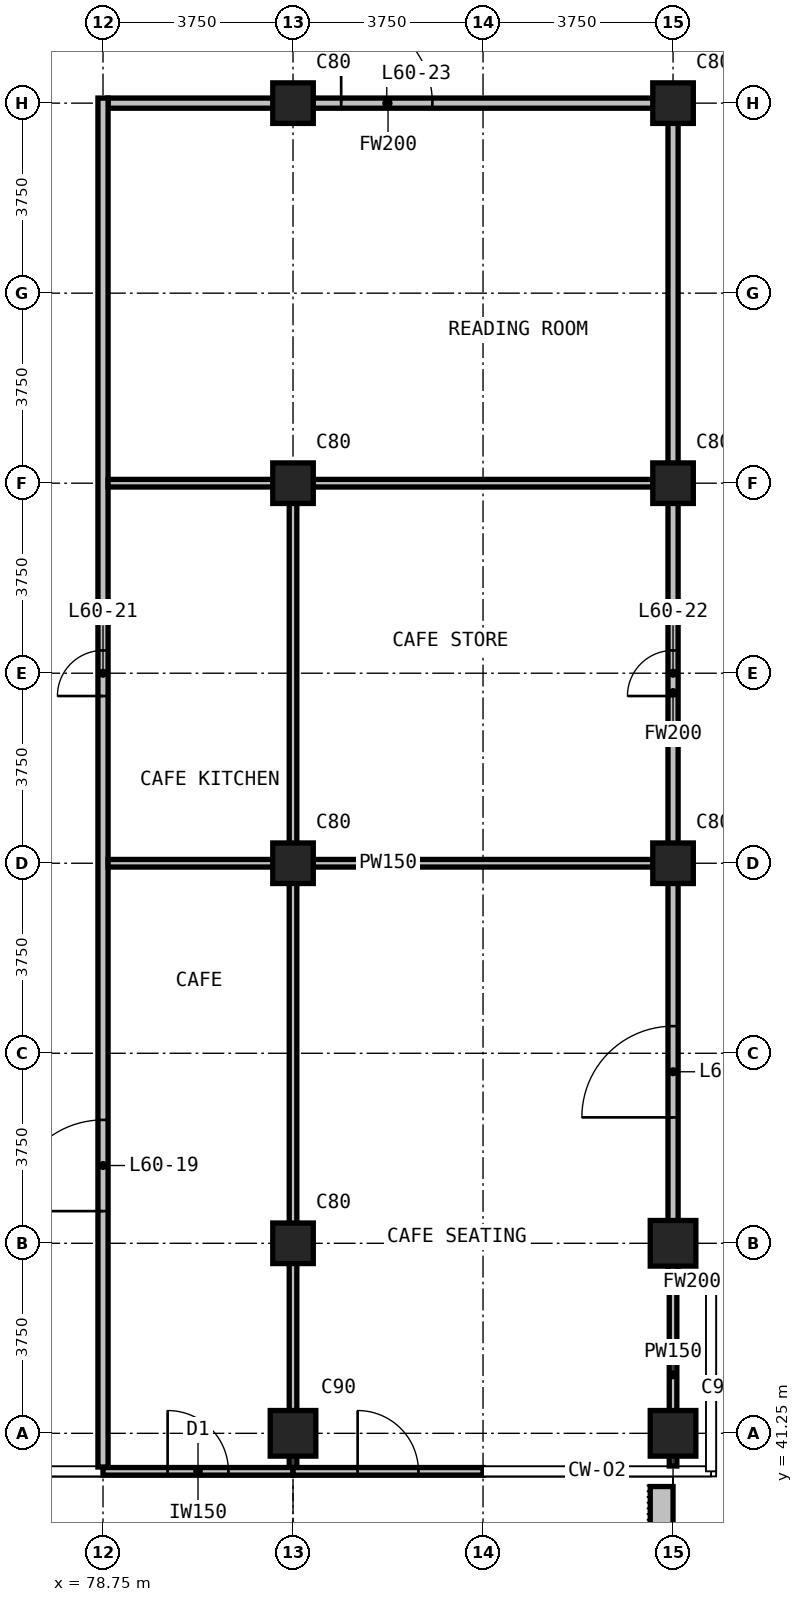
"""IFC4 building model, lengths in metres.
Left out: names, types, materials, properties, quantities, classifications, styles, units other than length and angle.
Written with IfcOpenShell. Run it as: python <this file> out.ifc"""

import sys

from ifc_helpers import new_model, si_unit, direction, frame, frame_2d, origin, origin_2d, place, context, subcontext, project, spatial, rectangle, extrude, element, fill, save


model = new_model("IFC4")
c1 = context("Model", 3, precision=1e-05, world=origin(), true_north=direction((0.0, 1.0)))
c2 = subcontext(c1, "Body", "Model", "MODEL_VIEW")
j1 = project(units=[si_unit("LENGTHUNIT", "METRE"), si_unit("PLANEANGLEUNIT", "RADIAN")], contexts=[c1])
p1 = place(None, origin())
s1 = spatial("IfcSite", under=j1, at=p1, CompositionType="ELEMENT")
p2 = place(p1, origin())
s2 = spatial("IfcBuilding", under=s1, at=p2, CompositionType="ELEMENT")
p3 = place(p2, frame((0.0, 0.0, 231.9)))
s3 = spatial("IfcBuildingStorey", under=s2, at=p3, CompositionType="ELEMENT", Elevation=231.9)
p4 = place(p3, frame((82.5, 41.25, 0.0), z_axis=(0.0, 0.0, 1.0), x_axis=(1.0, 0.0, 0.0)))
e1 = element("IfcColumn", 1, at=p4, inside=s3, PredefinedType="COLUMN", context=c2, shape_type="SweptSolid", body=[
    extrude(rectangle(XDim=0.9, YDim=0.9, at=origin_2d()), origin(), (0.0, 0.0, 1.0), 3.6),
])
for number, where, z_axis, x_axis in (
    (2, (82.5, 45.0, 0.0), (0.0, 0.0, 1.0), (1.0, 0.0, 0.0)),
    (3, (82.5, 52.5, 0.0), (0.0, 0.0, 1.0), (1.0, 0.0, 0.0)),
    (4, (82.5, 60.0, 0.0), (0.0, 0.0, 1.0), (1.0, 0.0, 0.0)),
    (5, (82.5, 67.5, 0.0), (0.0, 0.0, 1.0), (1.0, 0.0, 0.0)),
):
    element("IfcColumn", number, at=place(p3, frame(where, z_axis=z_axis, x_axis=x_axis)), inside=s3, PredefinedType="COLUMN", context=c2, shape_type="SweptSolid", body=[
        extrude(rectangle(XDim=0.8, YDim=0.8, at=origin_2d()), origin(), (0.0, 0.0, 1.0), 3.6),
    ])
for number, where, z_axis, x_axis in (
    (6, (90.0, 41.25, 0.0), (0.0, 0.0, 1.0), (1.0, 0.0, 0.0)),
    (7, (90.0, 45.0, 0.0), (0.0, 0.0, 1.0), (1.0, 0.0, 0.0)),
):
    element("IfcColumn", number, at=place(p3, frame(where, z_axis=z_axis, x_axis=x_axis)), inside=s3, PredefinedType="COLUMN", context=c2, shape_type="SweptSolid", body=[
        extrude(rectangle(XDim=0.9, YDim=0.9, at=origin_2d()), origin(), (0.0, 0.0, 1.0), 3.6),
    ])
for number, where, z_axis, x_axis in (
    (8, (90.0, 52.5, 0.0), (0.0, 0.0, 1.0), (1.0, 0.0, 0.0)),
    (9, (90.0, 60.0, 0.0), (0.0, 0.0, 1.0), (1.0, 0.0, 0.0)),
    (10, (90.0, 67.5, 0.0), (0.0, 0.0, 1.0), (1.0, 0.0, 0.0)),
):
    element("IfcColumn", number, at=place(p3, frame(where, z_axis=z_axis, x_axis=x_axis)), inside=s3, PredefinedType="COLUMN", context=c2, shape_type="SweptSolid", body=[
        extrude(rectangle(XDim=0.8, YDim=0.8, at=origin_2d()), origin(), (0.0, 0.0, 1.0), 3.6),
    ])
p5 = place(p3, frame((78.75, 40.5, 0.0), z_axis=(0.0, 0.0, 1.0), x_axis=(1.0, 0.0, 0.0)))
e11 = element("IfcWall", 11, at=p5, inside=s3, PredefinedType="SOLIDWALL", context=c2, shape_type="SweptSolid", body=[
    extrude(rectangle(XDim=3.75, YDim=0.15, at=frame_2d((1.875, 0.0))), origin(), (0.0, 0.0, 1.0), 3.3),
])
p6 = place(p5, frame((1.275, 0.0, 0.0)))
e12 = element("IfcOpeningElement", 12, at=p6, cuts=e11, PredefinedType="OPENING", context=c2, shape_type="SweptSolid", body=[
    extrude(rectangle(XDim=1.2, YDim=2.4, at=frame_2d((0.6, 1.2))), frame((0.0, 0.085, 0.0), z_axis=(0.0, -1.0, 0.0), x_axis=(1.0, 0.0, 0.0)), (0.0, 0.0, 1.0), 0.17),
])
p7 = place(p3, frame((82.5, 40.5, 0.0), z_axis=(0.0, 0.0, 1.0), x_axis=(1.0, 0.0, 0.0)))
e13 = element("IfcWall", 13, at=p7, inside=s3, PredefinedType="SOLIDWALL", context=c2, shape_type="SweptSolid", body=[
    extrude(rectangle(XDim=3.75, YDim=0.15, at=frame_2d((1.875, 0.0))), origin(), (0.0, 0.0, 1.0), 3.3),
])
p8 = place(p7, frame((1.275, 0.0, 0.0)))
e14 = element("IfcOpeningElement", 14, at=p8, cuts=e13, PredefinedType="OPENING", context=c2, shape_type="SweptSolid", body=[
    extrude(rectangle(XDim=1.2, YDim=2.4, at=frame_2d((0.6, 1.2))), frame((0.0, 0.085, 0.0), z_axis=(0.0, -1.0, 0.0), x_axis=(1.0, 0.0, 0.0)), (0.0, 0.0, 1.0), 0.17),
])
p9 = place(p3, frame((89.775, 40.2, 0.0), z_axis=(0.0, 0.0, 1.0), x_axis=(0.0, -1.0, 0.0)))
e15 = element("IfcWall", 15, at=p9, inside=s3, PredefinedType="USERDEFINED", context=c2, shape_type="SweptSolid", body=[
    extrude(rectangle(XDim=2.35, YDim=0.45, at=frame_2d((1.175, 0.0))), origin(), (0.0, 0.0, 1.0), 1.1),
])
p10 = place(p3, frame((90.1, 44.235, 0.0), z_axis=(0.0, 0.0, 1.0), x_axis=(1.0, 0.0, 0.0)))
e16 = element("IfcWall", 16, at=p10, inside=s3, PredefinedType="PARTITIONING", context=c2, shape_type="SweptSolid", body=[
    extrude(rectangle(XDim=0.545, YDim=0.2, at=frame_2d((0.272, 0.0))), origin(), (0.0, 0.0, 1.0), 3.3),
])
p11 = place(p3, frame((78.85, 67.5, 0.0), z_axis=(0.0, 0.0, 1.0), x_axis=(1.0, 0.0, 0.0)))
e17 = element("IfcWall", 17, at=p11, inside=s3, PredefinedType="PARTITIONING", context=c2, shape_type="SweptSolid", body=[
    extrude(rectangle(XDim=11.05, YDim=0.2, at=frame_2d((5.525, 0.0))), origin(), (0.0, 0.0, 1.0), 3.3),
])
p12 = place(p11, frame((4.6, 0.0, 0.0)))
e18 = element("IfcOpeningElement", 18, at=p12, cuts=e17, PredefinedType="OPENING", context=c2, shape_type="SweptSolid", body=[
    extrude(rectangle(XDim=1.8, YDim=2.2, at=frame_2d((0.9, 1.1))), frame((0.0, 0.11, 0.0), z_axis=(0.0, -1.0, 0.0), x_axis=(1.0, 0.0, 0.0)), (0.0, 0.0, 1.0), 0.22),
])
p13 = place(p3, frame((78.75, 40.585, 0.0), z_axis=(0.0, 0.0, 1.0), x_axis=(0.0, 1.0, 0.0)))
e19 = element("IfcWall", 19, at=p13, inside=s3, PredefinedType="PARTITIONING", context=c2, shape_type="SweptSolid", body=[
    extrude(rectangle(XDim=27.015, YDim=0.2, at=frame_2d((13.508, 0.0))), origin(), (0.0, 0.0, 1.0), 3.3),
])
p14 = place(p13, frame((5.05, 0.0, 0.0)))
e20 = element("IfcOpeningElement", 20, at=p14, cuts=e19, PredefinedType="OPENING", context=c2, shape_type="SweptSolid", body=[
    extrude(rectangle(XDim=1.8, YDim=2.2, at=frame_2d((0.9, 1.1))), frame((0.0, 0.11, 0.0), z_axis=(0.0, -1.0, 0.0), x_axis=(1.0, 0.0, 0.0)), (0.0, 0.0, 1.0), 0.22),
])
p15 = place(p13, frame((15.215, 0.0, 0.0)))
e21 = element("IfcOpeningElement", 21, at=p15, cuts=e19, PredefinedType="OPENING", context=c2, shape_type="SweptSolid", body=[
    extrude(rectangle(XDim=0.9, YDim=2.2, at=frame_2d((0.45, 1.1))), frame((0.0, 0.11, 0.0), z_axis=(0.0, -1.0, 0.0), x_axis=(1.0, 0.0, 0.0)), (0.0, 0.0, 1.0), 0.22),
])
p16 = place(p3, frame((90.0, 44.135, 0.0), z_axis=(0.0, 0.0, 1.0), x_axis=(0.0, 1.0, 0.0)))
e22 = element("IfcWall", 22, at=p16, inside=s3, PredefinedType="PARTITIONING", context=c2, shape_type="SweptSolid", body=[
    extrude(rectangle(XDim=23.465, YDim=0.2, at=frame_2d((11.732, 0.0))), origin(), (0.0, 0.0, 1.0), 3.3),
])
p17 = place(p16, frame((3.35, 0.0, 0.0)))
e23 = element("IfcOpeningElement", 23, at=p17, cuts=e22, PredefinedType="OPENING", context=c2, shape_type="SweptSolid", body=[
    extrude(rectangle(XDim=1.8, YDim=2.2, at=frame_2d((0.9, 1.1))), frame((0.0, 0.11, 0.0), z_axis=(0.0, -1.0, 0.0), x_axis=(1.0, 0.0, 0.0)), (0.0, 0.0, 1.0), 0.22),
])
p18 = place(p16, frame((11.665, 0.0, 0.0)))
e24 = element("IfcOpeningElement", 24, at=p18, cuts=e22, PredefinedType="OPENING", context=c2, shape_type="SweptSolid", body=[
    extrude(rectangle(XDim=0.9, YDim=2.2, at=frame_2d((0.45, 1.1))), frame((0.0, 0.11, 0.0), z_axis=(0.0, -1.0, 0.0), x_axis=(1.0, 0.0, 0.0)), (0.0, 0.0, 1.0), 0.22),
])
for number, where, z_axis, x_axis in (
    (25, (78.85, 52.5, 0.0), (0.0, 0.0, 1.0), (1.0, 0.0, 0.0)),
    (26, (78.85, 60.0, 0.0), (0.0, 0.0, 1.0), (1.0, 0.0, 0.0)),
):
    element("IfcWall", number, at=place(p3, frame(where, z_axis=z_axis, x_axis=x_axis)), inside=s3, PredefinedType="PARTITIONING", context=c2, shape_type="SweptSolid", body=[
        extrude(rectangle(XDim=11.05, YDim=0.15, at=frame_2d((5.525, 0.0))), origin(), (0.0, 0.0, 1.0), 3.3),
    ])
p19 = place(p3, frame((82.5, 40.585, 0.0), z_axis=(0.0, 0.0, 1.0), x_axis=(0.0, 1.0, 0.0)))
e27 = element("IfcWall", 27, at=p19, inside=s3, PredefinedType="PARTITIONING", context=c2, shape_type="SweptSolid", body=[
    extrude(rectangle(XDim=19.34, YDim=0.15, at=frame_2d((9.67, 0.0))), origin(), (0.0, 0.0, 1.0), 3.3),
])
p20 = place(p3, frame((90.0, 40.605, 0.0), z_axis=(0.0, 0.0, 1.0), x_axis=(0.0, 1.0, 0.0)))
e28 = element("IfcWall", 28, at=p20, inside=s3, PredefinedType="PARTITIONING", context=c2, shape_type="SweptSolid", body=[
    extrude(rectangle(XDim=3.6, YDim=0.15, at=frame_2d((1.8, 0.0))), origin(), (0.0, 0.0, 1.0), 3.3),
])
p21 = place(p6, origin())
e29 = element("IfcDoor", 29, at=p21, inside=s3, OperationType="SINGLE_SWING_LEFT", PredefinedType="DOOR", context=c2, shape_type="SweptSolid", body=[
    extrude(rectangle(XDim=1.2, YDim=2.4, at=frame_2d((0.6, 1.2))), frame((0.0, 0.025, 0.0), z_axis=(0.0, -1.0, 0.0), x_axis=(1.0, 0.0, 0.0)), (0.0, 0.0, 1.0), 0.05),
])
fill(e12, e29)
p22 = place(p8, origin())
e30 = element("IfcDoor", 30, at=p22, inside=s3, OperationType="SINGLE_SWING_LEFT", PredefinedType="DOOR", context=c2, shape_type="SweptSolid", body=[
    extrude(rectangle(XDim=1.2, YDim=2.4, at=frame_2d((0.6, 1.2))), frame((0.0, 0.025, 0.0), z_axis=(0.0, -1.0, 0.0), x_axis=(1.0, 0.0, 0.0)), (0.0, 0.0, 1.0), 0.05),
])
fill(e14, e30)
p23 = place(p14, origin())
e31 = element("IfcDoor", 31, at=p23, inside=s3, OperationType="DOUBLE_DOOR_SINGLE_SWING", PredefinedType="DOOR", context=c2, shape_type="SweptSolid", body=[
    extrude(rectangle(XDim=1.8, YDim=2.2, at=frame_2d((0.9, 1.1))), frame((0.0, 0.025, 0.0), z_axis=(0.0, -1.0, 0.0), x_axis=(1.0, 0.0, 0.0)), (0.0, 0.0, 1.0), 0.05),
])
fill(e20, e31)
p24 = place(p17, origin())
e32 = element("IfcDoor", 32, at=p24, inside=s3, OperationType="DOUBLE_DOOR_SINGLE_SWING", PredefinedType="DOOR", context=c2, shape_type="SweptSolid", body=[
    extrude(rectangle(XDim=1.8, YDim=2.2, at=frame_2d((0.9, 1.1))), frame((0.0, 0.025, 0.0), z_axis=(0.0, -1.0, 0.0), x_axis=(1.0, 0.0, 0.0)), (0.0, 0.0, 1.0), 0.05),
])
fill(e23, e32)
p25 = place(p15, origin())
e33 = element("IfcDoor", 33, at=p25, inside=s3, OperationType="SINGLE_SWING_LEFT", PredefinedType="DOOR", context=c2, shape_type="SweptSolid", body=[
    extrude(rectangle(XDim=0.9, YDim=2.2, at=frame_2d((0.45, 1.1))), frame((0.0, 0.025, 0.0), z_axis=(0.0, -1.0, 0.0), x_axis=(1.0, 0.0, 0.0)), (0.0, 0.0, 1.0), 0.05),
])
fill(e21, e33)
p26 = place(p18, origin())
e34 = element("IfcDoor", 34, at=p26, inside=s3, OperationType="SINGLE_SWING_RIGHT", PredefinedType="DOOR", context=c2, shape_type="SweptSolid", body=[
    extrude(rectangle(XDim=0.9, YDim=2.2, at=frame_2d((0.45, 1.1))), frame((0.0, 0.025, 0.0), z_axis=(0.0, -1.0, 0.0), x_axis=(1.0, 0.0, 0.0)), (0.0, 0.0, 1.0), 0.05),
])
fill(e24, e34)
p27 = place(p12, origin())
e35 = element("IfcDoor", 35, at=p27, inside=s3, OperationType="DOUBLE_DOOR_SINGLE_SWING", PredefinedType="DOOR", context=c2, shape_type="SweptSolid", body=[
    extrude(rectangle(XDim=1.8, YDim=2.2, at=frame_2d((0.9, 1.1))), frame((0.0, 0.025, 0.0), z_axis=(0.0, -1.0, 0.0), x_axis=(1.0, 0.0, 0.0)), (0.0, 0.0, 1.0), 0.05),
])
fill(e18, e35)
save(model, sys.argv[1])
